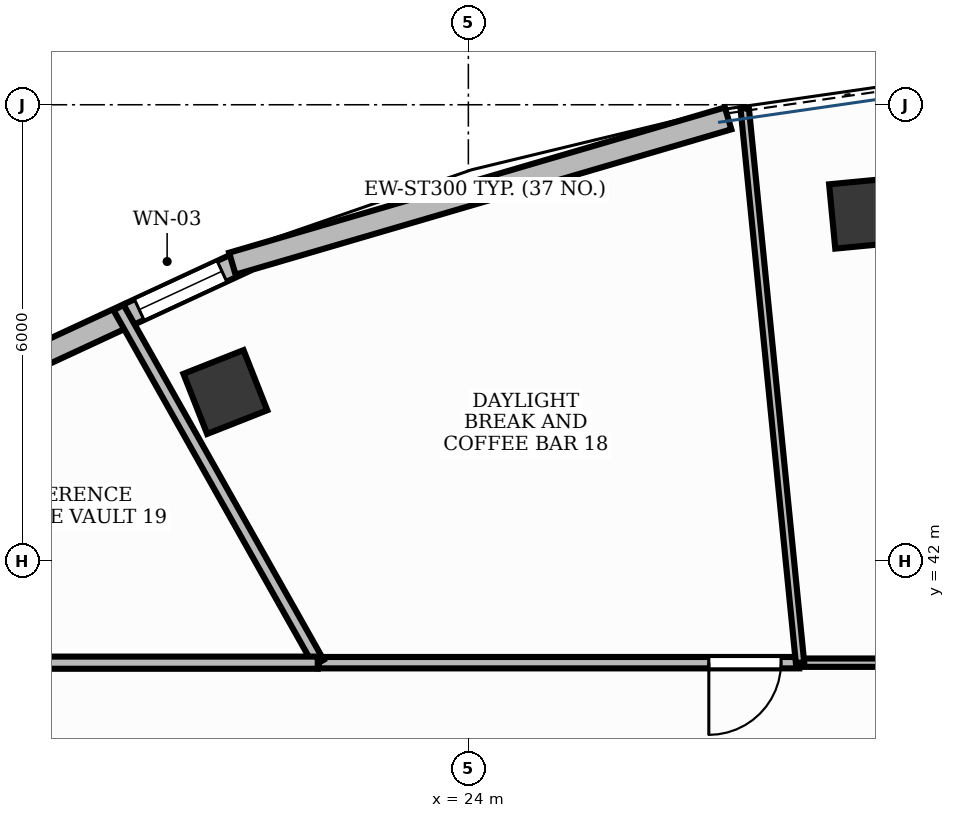
"""IFC4 building model, lengths in metres.
Left out: names, types, materials, properties, quantities, classifications, styles, units other than length and angle.
Written with IfcOpenShell. Run it as: python <this file> out.ifc"""

import sys

from ifc_helpers import new_model, si_unit, direction, frame, frame_2d, origin, origin_2d, place, context, subcontext, project, spatial, rectangle, extrude, element, fill, save


model = new_model("IFC4")
c1 = context("Model", 3, precision=1e-05, world=origin(), true_north=direction((0.0, 1.0)))
c2 = subcontext(c1, "Body", "Model", "MODEL_VIEW")
j1 = project(units=[si_unit("LENGTHUNIT", "METRE"), si_unit("PLANEANGLEUNIT", "RADIAN")], contexts=[c1])
p1 = place(None, origin())
s1 = spatial("IfcSite", under=j1, at=p1, CompositionType="ELEMENT")
p2 = place(p1, origin())
s2 = spatial("IfcBuilding", under=s1, at=p2, CompositionType="ELEMENT")
p3 = place(p2, frame((0.0, 0.0, 252.0)))
s3 = spatial("IfcBuildingStorey", under=s2, at=p3, CompositionType="ELEMENT", Elevation=252.0)
for number, where, z_axis, x_axis in (
    (1, (29.21, 46.571, -0.0), (0.0, 0.0, 1.0), (0.995, 0.095, 0.0)),
    (2, (20.803, 44.22, -0.0), (0.0, 0.0, 1.0), (0.93, 0.367, 0.0)),
):
    element("IfcColumn", number, at=place(p3, frame(where, z_axis=z_axis, x_axis=x_axis)), inside=s3, PredefinedType="COLUMN", context=c2, shape_type="SweptSolid", body=[
        extrude(rectangle(XDim=0.85, YDim=0.85, at=origin_2d()), origin(), (0.0, 0.0, 1.0), 3.901),
    ])
p4 = place(p3, frame((21.054, 45.947, 0.0), z_axis=(0.0, 0.0, 1.0), x_axis=(-0.907141680649, -0.420825345278, 0.0)))
e3 = element("IfcWall", 3, at=p4, inside=s3, PredefinedType="STANDARD", context=c2, shape_type="SweptSolid", body=[
    extrude(rectangle(XDim=3.336, YDim=0.3, at=frame_2d((1.668, 0.0))), origin(), (0.0, 0.0, 1.0), 3.9),
])
p5 = place(p4, frame((0.326, 0.0, 0.9)))
e4 = element("IfcOpeningElement", 4, at=p5, cuts=e3, PredefinedType="OPENING", context=c2, shape_type="SweptSolid", body=[
    extrude(rectangle(XDim=1.2, YDim=2.7, at=frame_2d((0.6, 1.35))), frame((0.0, 0.165, 0.0), z_axis=(0.0, -1.0, 0.0), x_axis=(1.0, 0.0, 0.0)), (0.0, 0.0, 1.0), 0.33),
])
p6 = place(p3, frame((27.418, 47.82, 0.0), z_axis=(0.0, 0.0, 1.0), x_axis=(-0.959675502853, -0.281110172749, 0.0)))
e5 = element("IfcWall", 5, at=p6, inside=s3, PredefinedType="STANDARD", context=c2, shape_type="SweptSolid", body=[
    extrude(rectangle(XDim=6.797, YDim=0.3, at=frame_2d((3.398, 0.0))), origin(), (0.0, 0.0, 1.0), 3.47),
])
p7 = place(p3, frame((35.891, 40.66, 0.0), z_axis=(0.0, 0.0, 1.0), x_axis=(-1.0, 0.0, 0.0)))
e6 = element("IfcWall", 6, at=p7, inside=s3, PredefinedType="MOVABLE", context=c2, shape_type="SweptSolid", body=[
    extrude(rectangle(XDim=7.527, YDim=0.11, at=frame_2d((3.763, 0.0))), origin(), (0.0, 0.0, 1.0), 2.91),
])
p8 = place(p7, frame((0.541, 0.0, 0.0)))
e7 = element("IfcOpeningElement", 7, at=p8, cuts=e6, PredefinedType="OPENING", context=c2, shape_type="SweptSolid", body=[
    extrude(rectangle(XDim=0.95, YDim=2.15, at=frame_2d((0.475, 1.075))), frame((0.0, 0.07, 0.0), z_axis=(0.0, -1.0, 0.0), x_axis=(1.0, 0.0, 0.0)), (0.0, 0.0, 1.0), 0.14),
])
p9 = place(p3, frame((28.354, 40.66, 0.0), z_axis=(0.0, 0.0, 1.0), x_axis=(-1.0, 0.0, 0.0)))
e8 = element("IfcWall", 8, at=p9, inside=s3, PredefinedType="PARTITIONING", context=c2, shape_type="SweptSolid", body=[
    extrude(rectangle(XDim=6.323, YDim=0.15, at=frame_2d((3.162, 0.0))), origin(), (0.0, 0.0, 1.0), 2.91),
])
p10 = place(p9, frame((0.24, 0.0, 0.0)))
e9 = element("IfcOpeningElement", 9, at=p10, cuts=e8, PredefinedType="OPENING", context=c2, shape_type="SweptSolid", body=[
    extrude(rectangle(XDim=0.95, YDim=2.15, at=frame_2d((0.475, 1.075))), frame((0.0, 0.09, 0.0), z_axis=(0.0, -1.0, 0.0), x_axis=(1.0, 0.0, 0.0)), (0.0, 0.0, 1.0), 0.18),
])
p11 = place(p3, frame((28.364, 40.66, 0.0), z_axis=(0.0, 0.0, 1.0), x_axis=(-0.09933896822, 0.995053651515, 0.0)))
e10 = element("IfcWall", 10, at=p11, inside=s3, PredefinedType="MOVABLE", context=c2, shape_type="SweptSolid", body=[
    extrude(rectangle(XDim=7.336, YDim=0.11, at=frame_2d((3.668, 0.0))), origin(), (0.0, 0.0, 1.0), 2.91),
])
p12 = place(p3, frame((22.031, 40.66, 0.0), z_axis=(0.0, 0.0, 1.0), x_axis=(-0.490903118402, 0.871214169044, 0.0)))
e11 = element("IfcWall", 11, at=p12, inside=s3, PredefinedType="PARTITIONING", context=c2, shape_type="SweptSolid", body=[
    extrude(rectangle(XDim=5.362, YDim=0.15, at=frame_2d((2.681, 0.0))), origin(), (0.0, 0.0, 1.0), 2.91),
])
p13 = place(p3, frame((22.019, 40.66, 0.0), z_axis=(0.0, 0.0, 1.0), x_axis=(-1.0, 0.0, 0.0)))
e12 = element("IfcWall", 12, at=p13, inside=s3, PredefinedType="PARTITIONING", context=c2, shape_type="SweptSolid", body=[
    extrude(rectangle(XDim=4.469, YDim=0.16, at=frame_2d((2.234, 0.0))), origin(), (0.0, 0.0, 1.0), 2.91),
])
p14 = place(p5, origin())
e13 = element("IfcWindow", 13, at=p14, inside=s3, PartitioningType="SINGLE_PANEL", PredefinedType="WINDOW", context=c2, shape_type="SweptSolid", body=[
    extrude(rectangle(XDim=1.2, YDim=2.7, at=frame_2d((0.6, 1.35))), frame((0.0, 0.03, 0.0), z_axis=(0.0, -1.0, 0.0), x_axis=(1.0, 0.0, 0.0)), (0.0, 0.0, 1.0), 0.06),
])
fill(e4, e13)
p15 = place(p10, origin())
e14 = element("IfcDoor", 14, at=p15, inside=s3, OperationType="SINGLE_SWING_RIGHT", PredefinedType="DOOR", context=c2, shape_type="SweptSolid", body=[
    extrude(rectangle(XDim=0.95, YDim=2.15, at=frame_2d((0.475, 1.075))), frame((0.0, 0.025, 0.0), z_axis=(0.0, -1.0, 0.0), x_axis=(1.0, 0.0, 0.0)), (0.0, 0.0, 1.0), 0.05),
])
fill(e9, e14)
save(model, sys.argv[1])
